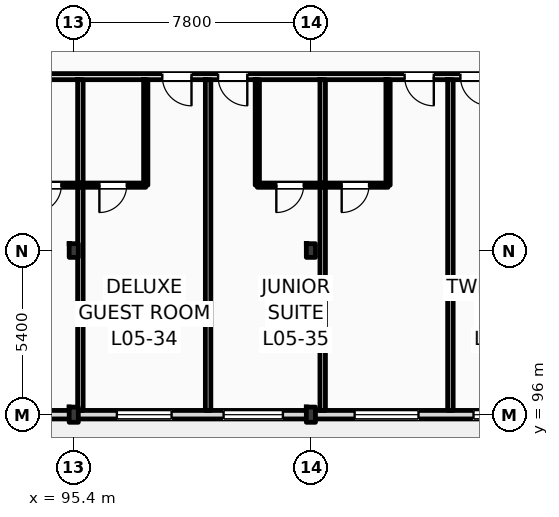
"""IFC4 building model, lengths in metres.
Left out: names, types, materials, properties, quantities, classifications, styles, units other than length and angle.
Written with IfcOpenShell. Run it as: python <this file> out.ifc"""

import sys

from ifc_helpers import new_model, si_unit, direction, frame, frame_2d, origin, origin_2d, place, context, subcontext, project, spatial, rectangle, i_section, extrude, element, fill, save


model = new_model("IFC4")
c1 = context("Model", 3, precision=1e-05, world=origin(), true_north=direction((0.0, 1.0)))
c2 = subcontext(c1, "Body", "Model", "MODEL_VIEW")
j1 = project(units=[si_unit("LENGTHUNIT", "METRE"), si_unit("PLANEANGLEUNIT", "RADIAN")], contexts=[c1])
p1 = place(None, origin())
s1 = spatial("IfcSite", under=j1, at=p1, CompositionType="ELEMENT")
p2 = place(p1, origin())
s2 = spatial("IfcBuilding", under=s1, at=p2, CompositionType="ELEMENT")
p3 = place(p2, frame((0.0, 0.0, 24.6)))
s3 = spatial("IfcBuildingStorey", under=s2, at=p3, CompositionType="ELEMENT", Elevation=24.6)
p4 = place(p3, frame((95.4, 96.0, 0.0), z_axis=(0.0, 0.0, 1.0), x_axis=(1.0, 0.0, 0.0)))
e1 = element("IfcColumn", 1, at=p4, inside=s3, PredefinedType="COLUMN", context=c2, shape_type="SweptSolid", body=[
    extrude(i_section(OverallWidth=0.3, OverallDepth=0.5, WebThickness=0.014, FlangeThickness=0.028, FilletRadius=0.027, at=origin_2d()), origin(), (0.0, 0.0, 1.0), 3.6),
])
p5 = place(p3, frame((95.4, 101.4, 0.0), z_axis=(0.0, 0.0, 1.0), x_axis=(1.0, 0.0, 0.0)))
e2 = element("IfcColumn", 2, at=p5, inside=s3, PredefinedType="COLUMN", context=c2, shape_type="SweptSolid", body=[
    extrude(i_section(OverallWidth=0.3, OverallDepth=0.45, WebThickness=0.014, FlangeThickness=0.026, FilletRadius=0.027, at=origin_2d()), origin(), (0.0, 0.0, 1.0), 3.6),
])
p6 = place(p3, frame((103.2, 96.0, 0.0), z_axis=(0.0, 0.0, 1.0), x_axis=(1.0, 0.0, 0.0)))
e3 = element("IfcColumn", 3, at=p6, inside=s3, PredefinedType="COLUMN", context=c2, shape_type="SweptSolid", body=[
    extrude(i_section(OverallWidth=0.3, OverallDepth=0.5, WebThickness=0.014, FlangeThickness=0.028, FilletRadius=0.027, at=origin_2d()), origin(), (0.0, 0.0, 1.0), 3.6),
])
p7 = place(p3, frame((103.2, 101.4, 0.0), z_axis=(0.0, 0.0, 1.0), x_axis=(1.0, 0.0, 0.0)))
e4 = element("IfcColumn", 4, at=p7, inside=s3, PredefinedType="COLUMN", context=c2, shape_type="SweptSolid", body=[
    extrude(i_section(OverallWidth=0.3, OverallDepth=0.45, WebThickness=0.014, FlangeThickness=0.026, FilletRadius=0.027, at=origin_2d()), origin(), (0.0, 0.0, 1.0), 3.6),
])
p8 = place(p3, frame((25.2, 96.0, 0.0), z_axis=(0.0, 0.0, 1.0), x_axis=(1.0, 0.0, 0.0)))
e5 = element("IfcWall", 5, at=p8, inside=s3, PredefinedType="STANDARD", context=c2, shape_type="SweptSolid", body=[
    extrude(rectangle(XDim=94.8, YDim=0.28, at=frame_2d((47.4, 0.0))), origin(), (0.0, 0.0, 1.0), 2.78),
])
p9 = place(p8, frame((16.539, 0.0, 0.9)))
e6 = element("IfcOpeningElement", 6, at=p9, cuts=e5, PredefinedType="OPENING", context=c2, shape_type="SweptSolid", body=[
    extrude(rectangle(XDim=1.75, YDim=1.7, at=frame_2d((0.875, 0.85))), frame((0.0, 0.15, 0.0), z_axis=(0.0, -1.0, 0.0), x_axis=(1.0, 0.0, 0.0)), (0.0, 0.0, 1.0), 0.3),
])
p10 = place(p8, frame((20.367, 0.0, 0.9)))
e7 = element("IfcOpeningElement", 7, at=p10, cuts=e5, PredefinedType="OPENING", context=c2, shape_type="SweptSolid", body=[
    extrude(rectangle(XDim=2.0, YDim=1.7, at=frame_2d((1.0, 0.85))), frame((0.0, 0.15, 0.0), z_axis=(0.0, -1.0, 0.0), x_axis=(1.0, 0.0, 0.0)), (0.0, 0.0, 1.0), 0.3),
])
p11 = place(p8, frame((24.326, 0.0, 0.9)))
e8 = element("IfcOpeningElement", 8, at=p11, cuts=e5, PredefinedType="OPENING", context=c2, shape_type="SweptSolid", body=[
    extrude(rectangle(XDim=2.3, YDim=1.7, at=frame_2d((1.15, 0.85))), frame((0.0, 0.15, 0.0), z_axis=(0.0, -1.0, 0.0), x_axis=(1.0, 0.0, 0.0)), (0.0, 0.0, 1.0), 0.3),
])
p12 = place(p8, frame((27.684, 0.0, 0.9)))
e9 = element("IfcOpeningElement", 9, at=p12, cuts=e5, PredefinedType="OPENING", context=c2, shape_type="SweptSolid", body=[
    extrude(rectangle(XDim=2.6, YDim=1.7, at=frame_2d((1.3, 0.85))), frame((0.0, 0.15, 0.0), z_axis=(0.0, -1.0, 0.0), x_axis=(1.0, 0.0, 0.0)), (0.0, 0.0, 1.0), 0.3),
])
p13 = place(p8, frame((32.083, 0.0, 0.9)))
e10 = element("IfcOpeningElement", 10, at=p13, cuts=e5, PredefinedType="OPENING", context=c2, shape_type="SweptSolid", body=[
    extrude(rectangle(XDim=2.419, YDim=1.7, at=frame_2d((1.209, 0.85))), frame((0.0, 0.15, 0.0), z_axis=(0.0, -1.0, 0.0), x_axis=(1.0, 0.0, 0.0)), (0.0, 0.0, 1.0), 0.3),
])
p14 = place(p8, frame((35.322, 0.0, 0.9)))
e11 = element("IfcOpeningElement", 11, at=p14, cuts=e5, PredefinedType="OPENING", context=c2, shape_type="SweptSolid", body=[
    extrude(rectangle(XDim=2.868, YDim=1.7, at=frame_2d((1.434, 0.85))), frame((0.0, 0.15, 0.0), z_axis=(0.0, -1.0, 0.0), x_axis=(1.0, 0.0, 0.0)), (0.0, 0.0, 1.0), 0.3),
])
p15 = place(p8, frame((56.015, 0.0, 0.9)))
e12 = element("IfcOpeningElement", 12, at=p15, cuts=e5, PredefinedType="OPENING", context=c2, shape_type="SweptSolid", body=[
    extrude(rectangle(XDim=1.2, YDim=1.7, at=frame_2d((0.6, 0.85))), frame((0.0, 0.15, 0.0), z_axis=(0.0, -1.0, 0.0), x_axis=(1.0, 0.0, 0.0)), (0.0, 0.0, 1.0), 0.3),
])
p16 = place(p8, frame((59.888, 0.0, 0.9)))
e13 = element("IfcOpeningElement", 13, at=p16, cuts=e5, PredefinedType="OPENING", context=c2, shape_type="SweptSolid", body=[
    extrude(rectangle(XDim=1.35, YDim=1.7, at=frame_2d((0.675, 0.85))), frame((0.0, 0.15, 0.0), z_axis=(0.0, -1.0, 0.0), x_axis=(1.0, 0.0, 0.0)), (0.0, 0.0, 1.0), 0.3),
])
p17 = place(p8, frame((63.799, 0.0, 0.9)))
e14 = element("IfcOpeningElement", 14, at=p17, cuts=e5, PredefinedType="OPENING", context=c2, shape_type="SweptSolid", body=[
    extrude(rectangle(XDim=1.5, YDim=1.7, at=frame_2d((0.75, 0.85))), frame((0.0, 0.15, 0.0), z_axis=(0.0, -1.0, 0.0), x_axis=(1.0, 0.0, 0.0)), (0.0, 0.0, 1.0), 0.3),
])
p18 = place(p8, frame((67.709, 0.0, 0.9)))
e15 = element("IfcOpeningElement", 15, at=p18, cuts=e5, PredefinedType="OPENING", context=c2, shape_type="SweptSolid", body=[
    extrude(rectangle(XDim=1.65, YDim=1.7, at=frame_2d((0.825, 0.85))), frame((0.0, 0.15, 0.0), z_axis=(0.0, -1.0, 0.0), x_axis=(1.0, 0.0, 0.0)), (0.0, 0.0, 1.0), 0.3),
])
p19 = place(p8, frame((71.618, 0.0, 0.9)))
e16 = element("IfcOpeningElement", 16, at=p19, cuts=e5, PredefinedType="OPENING", context=c2, shape_type="SweptSolid", body=[
    extrude(rectangle(XDim=1.8, YDim=1.7, at=frame_2d((0.9, 0.85))), frame((0.0, 0.15, 0.0), z_axis=(0.0, -1.0, 0.0), x_axis=(1.0, 0.0, 0.0)), (0.0, 0.0, 1.0), 0.3),
])
p20 = place(p8, frame((75.129, 0.0, 0.9)))
e17 = element("IfcOpeningElement", 17, at=p20, cuts=e5, PredefinedType="OPENING", context=c2, shape_type="SweptSolid", body=[
    extrude(rectangle(XDim=1.95, YDim=1.7, at=frame_2d((0.975, 0.85))), frame((0.0, 0.15, 0.0), z_axis=(0.0, -1.0, 0.0), x_axis=(1.0, 0.0, 0.0)), (0.0, 0.0, 1.0), 0.3),
])
p21 = place(p8, frame((79.439, 0.0, 0.9)))
e18 = element("IfcOpeningElement", 18, at=p21, cuts=e5, PredefinedType="OPENING", context=c2, shape_type="SweptSolid", body=[
    extrude(rectangle(XDim=2.1, YDim=1.7, at=frame_2d((1.05, 0.85))), frame((0.0, 0.15, 0.0), z_axis=(0.0, -1.0, 0.0), x_axis=(1.0, 0.0, 0.0)), (0.0, 0.0, 1.0), 0.3),
])
p22 = place(p8, frame((83.349, 0.0, 0.9)))
e19 = element("IfcOpeningElement", 19, at=p22, cuts=e5, PredefinedType="OPENING", context=c2, shape_type="SweptSolid", body=[
    extrude(rectangle(XDim=2.25, YDim=1.7, at=frame_2d((1.125, 0.85))), frame((0.0, 0.15, 0.0), z_axis=(0.0, -1.0, 0.0), x_axis=(1.0, 0.0, 0.0)), (0.0, 0.0, 1.0), 0.3),
])
p23 = place(p8, frame((87.258, 0.0, 0.9)))
e20 = element("IfcOpeningElement", 20, at=p23, cuts=e5, PredefinedType="OPENING", context=c2, shape_type="SweptSolid", body=[
    extrude(rectangle(XDim=2.4, YDim=1.7, at=frame_2d((1.2, 0.85))), frame((0.0, 0.15, 0.0), z_axis=(0.0, -1.0, 0.0), x_axis=(1.0, 0.0, 0.0)), (0.0, 0.0, 1.0), 0.3),
])
p24 = place(p8, frame((91.204, 0.0, 0.9)))
e21 = element("IfcOpeningElement", 21, at=p24, cuts=e5, PredefinedType="OPENING", context=c2, shape_type="SweptSolid", body=[
    extrude(rectangle(XDim=2.55, YDim=1.7, at=frame_2d((1.275, 0.85))), frame((0.0, 0.15, 0.0), z_axis=(0.0, -1.0, 0.0), x_axis=(1.0, 0.0, 0.0)), (0.0, 0.0, 1.0), 0.3),
])
p25 = place(p3, frame((79.76, 107.12, 0.0), z_axis=(0.0, 0.0, 1.0), x_axis=(1.0, 0.0, 0.0)))
e22 = element("IfcWall", 22, at=p25, inside=s3, PredefinedType="PARTITIONING", context=c2, shape_type="SweptSolid", body=[
    extrude(rectangle(XDim=40.1, YDim=0.2, at=frame_2d((20.05, 0.0))), origin(), (0.0, 0.0, 1.0), 3.34),
])
p26 = place(p25, frame((2.65, 0.0, 0.0)))
e23 = element("IfcOpeningElement", 23, at=p26, cuts=e22, PredefinedType="OPENING", context=c2, shape_type="SweptSolid", body=[
    extrude(rectangle(XDim=0.96, YDim=2.2, at=frame_2d((0.48, 1.1))), frame((0.0, 0.11, 0.0), z_axis=(0.0, -1.0, 0.0), x_axis=(1.0, 0.0, 0.0)), (0.0, 0.0, 1.0), 0.22),
])
p27 = place(p25, frame((4.448, 0.0, 0.0)))
e24 = element("IfcOpeningElement", 24, at=p27, cuts=e22, PredefinedType="OPENING", context=c2, shape_type="SweptSolid", body=[
    extrude(rectangle(XDim=0.96, YDim=2.2, at=frame_2d((0.48, 1.1))), frame((0.0, 0.11, 0.0), z_axis=(0.0, -1.0, 0.0), x_axis=(1.0, 0.0, 0.0)), (0.0, 0.0, 1.0), 0.22),
])
p28 = place(p25, frame((10.583, 0.0, 0.0)))
e25 = element("IfcOpeningElement", 25, at=p28, cuts=e22, PredefinedType="OPENING", context=c2, shape_type="SweptSolid", body=[
    extrude(rectangle(XDim=0.96, YDim=2.2, at=frame_2d((0.48, 1.1))), frame((0.0, 0.11, 0.0), z_axis=(0.0, -1.0, 0.0), x_axis=(1.0, 0.0, 0.0)), (0.0, 0.0, 1.0), 0.22),
])
p29 = place(p25, frame((12.418, 0.0, 0.0)))
e26 = element("IfcOpeningElement", 26, at=p29, cuts=e22, PredefinedType="OPENING", context=c2, shape_type="SweptSolid", body=[
    extrude(rectangle(XDim=0.96, YDim=2.2, at=frame_2d((0.48, 1.1))), frame((0.0, 0.11, 0.0), z_axis=(0.0, -1.0, 0.0), x_axis=(1.0, 0.0, 0.0)), (0.0, 0.0, 1.0), 0.22),
])
p30 = place(p25, frame((18.553, 0.0, 0.0)))
e27 = element("IfcOpeningElement", 27, at=p30, cuts=e22, PredefinedType="OPENING", context=c2, shape_type="SweptSolid", body=[
    extrude(rectangle(XDim=0.96, YDim=2.2, at=frame_2d((0.48, 1.1))), frame((0.0, 0.11, 0.0), z_axis=(0.0, -1.0, 0.0), x_axis=(1.0, 0.0, 0.0)), (0.0, 0.0, 1.0), 0.22),
])
p31 = place(p25, frame((20.388, 0.0, 0.0)))
e28 = element("IfcOpeningElement", 28, at=p31, cuts=e22, PredefinedType="OPENING", context=c2, shape_type="SweptSolid", body=[
    extrude(rectangle(XDim=0.96, YDim=2.2, at=frame_2d((0.48, 1.1))), frame((0.0, 0.11, 0.0), z_axis=(0.0, -1.0, 0.0), x_axis=(1.0, 0.0, 0.0)), (0.0, 0.0, 1.0), 0.22),
])
p32 = place(p25, frame((26.523, 0.0, 0.0)))
e29 = element("IfcOpeningElement", 29, at=p32, cuts=e22, PredefinedType="OPENING", context=c2, shape_type="SweptSolid", body=[
    extrude(rectangle(XDim=0.96, YDim=2.2, at=frame_2d((0.48, 1.1))), frame((0.0, 0.11, 0.0), z_axis=(0.0, -1.0, 0.0), x_axis=(1.0, 0.0, 0.0)), (0.0, 0.0, 1.0), 0.22),
])
p33 = place(p25, frame((28.358, 0.0, 0.0)))
e30 = element("IfcOpeningElement", 30, at=p33, cuts=e22, PredefinedType="OPENING", context=c2, shape_type="SweptSolid", body=[
    extrude(rectangle(XDim=0.96, YDim=2.2, at=frame_2d((0.48, 1.1))), frame((0.0, 0.11, 0.0), z_axis=(0.0, -1.0, 0.0), x_axis=(1.0, 0.0, 0.0)), (0.0, 0.0, 1.0), 0.22),
])
p34 = place(p25, frame((34.493, 0.0, 0.0)))
e31 = element("IfcOpeningElement", 31, at=p34, cuts=e22, PredefinedType="OPENING", context=c2, shape_type="SweptSolid", body=[
    extrude(rectangle(XDim=0.96, YDim=2.2, at=frame_2d((0.48, 1.1))), frame((0.0, 0.11, 0.0), z_axis=(0.0, -1.0, 0.0), x_axis=(1.0, 0.0, 0.0)), (0.0, 0.0, 1.0), 0.22),
])
p35 = place(p25, frame((36.364, 0.0, 0.0)))
e32 = element("IfcOpeningElement", 32, at=p35, cuts=e22, PredefinedType="OPENING", context=c2, shape_type="SweptSolid", body=[
    extrude(rectangle(XDim=0.96, YDim=2.2, at=frame_2d((0.48, 1.1))), frame((0.0, 0.11, 0.0), z_axis=(0.0, -1.0, 0.0), x_axis=(1.0, 0.0, 0.0)), (0.0, 0.0, 1.0), 0.22),
])
p36 = place(p3, frame((95.618, 96.14, 0.0), z_axis=(0.0, 0.0, 1.0), x_axis=(0.0, 1.0, 0.0)))
e33 = element("IfcWall", 33, at=p36, inside=s3, PredefinedType="PARTITIONING", context=c2, shape_type="SweptSolid", body=[
    extrude(rectangle(XDim=10.88, YDim=0.18, at=frame_2d((5.44, 0.0))), origin(), (0.0, 0.0, 1.0), 2.93),
])
p37 = place(p3, frame((93.468, 103.55, 0.0), z_axis=(0.0, 0.0, 1.0), x_axis=(1.0, 0.0, 0.0)))
e34 = element("IfcWall", 34, at=p37, inside=s3, PredefinedType="PARTITIONING", context=c2, shape_type="SweptSolid", body=[
    extrude(rectangle(XDim=2.15, YDim=0.14, at=frame_2d((1.075, 0.0))), origin(), (0.0, 0.0, 1.0), 3.34),
])
p38 = place(p37, frame((0.625, 0.0, 0.0)))
e35 = element("IfcOpeningElement", 35, at=p38, cuts=e34, PredefinedType="OPENING", context=c2, shape_type="SweptSolid", body=[
    extrude(rectangle(XDim=0.9, YDim=2.1, at=frame_2d((0.45, 1.05))), frame((0.0, 0.08, 0.0), z_axis=(0.0, -1.0, 0.0), x_axis=(1.0, 0.0, 0.0)), (0.0, 0.0, 1.0), 0.16),
])
p39 = place(p3, frame((99.819, 96.14, 0.0), z_axis=(0.0, 0.0, 1.0), x_axis=(0.0, 1.0, 0.0)))
e36 = element("IfcWall", 36, at=p39, inside=s3, PredefinedType="PARTITIONING", context=c2, shape_type="SweptSolid", body=[
    extrude(rectangle(XDim=10.88, YDim=0.18, at=frame_2d((5.44, 0.0))), origin(), (0.0, 0.0, 1.0), 3.34),
])
p40 = place(p3, frame((97.768, 103.55, 0.0), z_axis=(0.0, 0.0, 1.0), x_axis=(0.0, 1.0, 0.0)))
e37 = element("IfcWall", 37, at=p40, inside=s3, PredefinedType="PARTITIONING", context=c2, shape_type="SweptSolid", body=[
    extrude(rectangle(XDim=3.47, YDim=0.14, at=frame_2d((1.735, 0.0))), origin(), (0.0, 0.0, 1.0), 3.34),
])
p41 = place(p3, frame((95.618, 103.55, 0.0), z_axis=(0.0, 0.0, 1.0), x_axis=(1.0, 0.0, 0.0)))
e38 = element("IfcWall", 38, at=p41, inside=s3, PredefinedType="PARTITIONING", context=c2, shape_type="SweptSolid", body=[
    extrude(rectangle(XDim=2.15, YDim=0.14, at=frame_2d((1.075, 0.0))), origin(), (0.0, 0.0, 1.0), 3.34),
])
p42 = place(p41, frame((0.625, 0.0, 0.0)))
e39 = element("IfcOpeningElement", 39, at=p42, cuts=e38, PredefinedType="OPENING", context=c2, shape_type="SweptSolid", body=[
    extrude(rectangle(XDim=0.9, YDim=2.1, at=frame_2d((0.45, 1.05))), frame((0.0, 0.08, 0.0), z_axis=(0.0, -1.0, 0.0), x_axis=(1.0, 0.0, 0.0)), (0.0, 0.0, 1.0), 0.16),
])
p43 = place(p3, frame((103.588, 96.14, 0.0), z_axis=(0.0, 0.0, 1.0), x_axis=(0.0, 1.0, 0.0)))
e40 = element("IfcWall", 40, at=p43, inside=s3, PredefinedType="PARTITIONING", context=c2, shape_type="SweptSolid", body=[
    extrude(rectangle(XDim=10.88, YDim=0.18, at=frame_2d((5.44, 0.0))), origin(), (0.0, 0.0, 1.0), 3.34),
])
p44 = place(p3, frame((101.438, 103.55, 0.0), z_axis=(0.0, 0.0, 1.0), x_axis=(0.0, 1.0, 0.0)))
e41 = element("IfcWall", 41, at=p44, inside=s3, PredefinedType="PARTITIONING", context=c2, shape_type="SweptSolid", body=[
    extrude(rectangle(XDim=3.47, YDim=0.14, at=frame_2d((1.735, 0.0))), origin(), (0.0, 0.0, 1.0), 3.34),
])
p45 = place(p3, frame((101.438, 103.55, 0.0), z_axis=(0.0, 0.0, 1.0), x_axis=(1.0, 0.0, 0.0)))
e42 = element("IfcWall", 42, at=p45, inside=s3, PredefinedType="PARTITIONING", context=c2, shape_type="SweptSolid", body=[
    extrude(rectangle(XDim=2.15, YDim=0.14, at=frame_2d((1.075, 0.0))), origin(), (0.0, 0.0, 1.0), 3.34),
])
p46 = place(p45, frame((0.625, 0.0, 0.0)))
e43 = element("IfcOpeningElement", 43, at=p46, cuts=e42, PredefinedType="OPENING", context=c2, shape_type="SweptSolid", body=[
    extrude(rectangle(XDim=0.9, YDim=2.1, at=frame_2d((0.45, 1.05))), frame((0.0, 0.08, 0.0), z_axis=(0.0, -1.0, 0.0), x_axis=(1.0, 0.0, 0.0)), (0.0, 0.0, 1.0), 0.16),
])
p47 = place(p3, frame((107.789, 96.14, 0.0), z_axis=(0.0, 0.0, 1.0), x_axis=(0.0, 1.0, 0.0)))
e44 = element("IfcWall", 44, at=p47, inside=s3, PredefinedType="PARTITIONING", context=c2, shape_type="SweptSolid", body=[
    extrude(rectangle(XDim=10.88, YDim=0.18, at=frame_2d((5.44, 0.0))), origin(), (0.0, 0.0, 1.0), 3.34),
])
p48 = place(p3, frame((105.738, 103.55, 0.0), z_axis=(0.0, 0.0, 1.0), x_axis=(0.0, 1.0, 0.0)))
e45 = element("IfcWall", 45, at=p48, inside=s3, PredefinedType="PARTITIONING", context=c2, shape_type="SweptSolid", body=[
    extrude(rectangle(XDim=3.47, YDim=0.14, at=frame_2d((1.735, 0.0))), origin(), (0.0, 0.0, 1.0), 3.34),
])
p49 = place(p3, frame((103.588, 103.55, 0.0), z_axis=(0.0, 0.0, 1.0), x_axis=(1.0, 0.0, 0.0)))
e46 = element("IfcWall", 46, at=p49, inside=s3, PredefinedType="PARTITIONING", context=c2, shape_type="SweptSolid", body=[
    extrude(rectangle(XDim=2.15, YDim=0.14, at=frame_2d((1.075, 0.0))), origin(), (0.0, 0.0, 1.0), 3.34),
])
p50 = place(p49, frame((0.625, 0.0, 0.0)))
e47 = element("IfcOpeningElement", 47, at=p50, cuts=e46, PredefinedType="OPENING", context=c2, shape_type="SweptSolid", body=[
    extrude(rectangle(XDim=0.9, YDim=2.1, at=frame_2d((0.45, 1.05))), frame((0.0, 0.08, 0.0), z_axis=(0.0, -1.0, 0.0), x_axis=(1.0, 0.0, 0.0)), (0.0, 0.0, 1.0), 0.16),
])
p51 = place(p19, origin())
e48 = element("IfcWindow", 48, at=p51, inside=s3, PartitioningType="DOUBLE_PANEL_VERTICAL", PredefinedType="WINDOW", context=c2, shape_type="SweptSolid", body=[
    extrude(rectangle(XDim=1.8, YDim=1.7, at=frame_2d((0.9, 0.85))), frame((0.0, 0.03, 0.0), z_axis=(0.0, -1.0, 0.0), x_axis=(1.0, 0.0, 0.0)), (0.0, 0.0, 1.0), 0.06),
])
fill(e16, e48)
p52 = place(p20, origin())
e49 = element("IfcWindow", 49, at=p52, inside=s3, PartitioningType="DOUBLE_PANEL_VERTICAL", PredefinedType="WINDOW", context=c2, shape_type="SweptSolid", body=[
    extrude(rectangle(XDim=1.95, YDim=1.7, at=frame_2d((0.975, 0.85))), frame((0.0, 0.03, 0.0), z_axis=(0.0, -1.0, 0.0), x_axis=(1.0, 0.0, 0.0)), (0.0, 0.0, 1.0), 0.06),
])
fill(e17, e49)
p53 = place(p21, origin())
e50 = element("IfcWindow", 50, at=p53, inside=s3, PartitioningType="DOUBLE_PANEL_VERTICAL", PredefinedType="WINDOW", context=c2, shape_type="SweptSolid", body=[
    extrude(rectangle(XDim=2.1, YDim=1.7, at=frame_2d((1.05, 0.85))), frame((0.0, 0.03, 0.0), z_axis=(0.0, -1.0, 0.0), x_axis=(1.0, 0.0, 0.0)), (0.0, 0.0, 1.0), 0.06),
])
fill(e18, e50)
p54 = place(p22, origin())
e51 = element("IfcWindow", 51, at=p54, inside=s3, PartitioningType="DOUBLE_PANEL_VERTICAL", PredefinedType="WINDOW", context=c2, shape_type="SweptSolid", body=[
    extrude(rectangle(XDim=2.25, YDim=1.7, at=frame_2d((1.125, 0.85))), frame((0.0, 0.03, 0.0), z_axis=(0.0, -1.0, 0.0), x_axis=(1.0, 0.0, 0.0)), (0.0, 0.0, 1.0), 0.06),
])
fill(e19, e51)
p55 = place(p38, frame((0.9, 0.0, 0.0), z_axis=(0.0, 0.0, 1.0), x_axis=(-1.0, 0.0, 0.0)))
e52 = element("IfcDoor", 52, at=p55, inside=s3, OperationType="SINGLE_SWING_LEFT", PredefinedType="DOOR", context=c2, shape_type="SweptSolid", body=[
    extrude(rectangle(XDim=0.9, YDim=2.1, at=frame_2d((0.45, 1.05))), frame((0.0, 0.025, 0.0), z_axis=(0.0, -1.0, 0.0), x_axis=(1.0, 0.0, 0.0)), (0.0, 0.0, 1.0), 0.05),
])
fill(e35, e52)
p56 = place(p30, frame((0.96, 0.0, 0.0), z_axis=(0.0, 0.0, 1.0), x_axis=(-1.0, 0.0, 0.0)))
e53 = element("IfcDoor", 53, at=p56, inside=s3, OperationType="SINGLE_SWING_RIGHT", PredefinedType="DOOR", context=c2, shape_type="SweptSolid", body=[
    extrude(rectangle(XDim=0.96, YDim=2.2, at=frame_2d((0.48, 1.1))), frame((0.0, 0.025, 0.0), z_axis=(0.0, -1.0, 0.0), x_axis=(1.0, 0.0, 0.0)), (0.0, 0.0, 1.0), 0.05),
])
fill(e27, e53)
p57 = place(p42, frame((0.9, 0.0, 0.0), z_axis=(0.0, 0.0, 1.0), x_axis=(-1.0, 0.0, 0.0)))
e54 = element("IfcDoor", 54, at=p57, inside=s3, OperationType="SINGLE_SWING_LEFT", PredefinedType="DOOR", context=c2, shape_type="SweptSolid", body=[
    extrude(rectangle(XDim=0.9, YDim=2.1, at=frame_2d((0.45, 1.05))), frame((0.0, 0.025, 0.0), z_axis=(0.0, -1.0, 0.0), x_axis=(1.0, 0.0, 0.0)), (0.0, 0.0, 1.0), 0.05),
])
fill(e39, e54)
p58 = place(p31, frame((0.96, 0.0, 0.0), z_axis=(0.0, 0.0, 1.0), x_axis=(-1.0, 0.0, 0.0)))
e55 = element("IfcDoor", 55, at=p58, inside=s3, OperationType="SINGLE_SWING_RIGHT", PredefinedType="DOOR", context=c2, shape_type="SweptSolid", body=[
    extrude(rectangle(XDim=0.96, YDim=2.2, at=frame_2d((0.48, 1.1))), frame((0.0, 0.025, 0.0), z_axis=(0.0, -1.0, 0.0), x_axis=(1.0, 0.0, 0.0)), (0.0, 0.0, 1.0), 0.05),
])
fill(e28, e55)
p59 = place(p46, frame((0.9, 0.0, 0.0), z_axis=(0.0, 0.0, 1.0), x_axis=(-1.0, 0.0, 0.0)))
e56 = element("IfcDoor", 56, at=p59, inside=s3, OperationType="SINGLE_SWING_LEFT", PredefinedType="DOOR", context=c2, shape_type="SweptSolid", body=[
    extrude(rectangle(XDim=0.9, YDim=2.1, at=frame_2d((0.45, 1.05))), frame((0.0, 0.025, 0.0), z_axis=(0.0, -1.0, 0.0), x_axis=(1.0, 0.0, 0.0)), (0.0, 0.0, 1.0), 0.05),
])
fill(e43, e56)
p60 = place(p32, frame((0.96, 0.0, 0.0), z_axis=(0.0, 0.0, 1.0), x_axis=(-1.0, 0.0, 0.0)))
e57 = element("IfcDoor", 57, at=p60, inside=s3, OperationType="SINGLE_SWING_RIGHT", PredefinedType="DOOR", context=c2, shape_type="SweptSolid", body=[
    extrude(rectangle(XDim=0.96, YDim=2.2, at=frame_2d((0.48, 1.1))), frame((0.0, 0.025, 0.0), z_axis=(0.0, -1.0, 0.0), x_axis=(1.0, 0.0, 0.0)), (0.0, 0.0, 1.0), 0.05),
])
fill(e29, e57)
p61 = place(p50, frame((0.9, 0.0, 0.0), z_axis=(0.0, 0.0, 1.0), x_axis=(-1.0, 0.0, 0.0)))
e58 = element("IfcDoor", 58, at=p61, inside=s3, OperationType="SINGLE_SWING_LEFT", PredefinedType="DOOR", context=c2, shape_type="SweptSolid", body=[
    extrude(rectangle(XDim=0.9, YDim=2.1, at=frame_2d((0.45, 1.05))), frame((0.0, 0.025, 0.0), z_axis=(0.0, -1.0, 0.0), x_axis=(1.0, 0.0, 0.0)), (0.0, 0.0, 1.0), 0.05),
])
fill(e47, e58)
p62 = place(p33, frame((0.96, 0.0, 0.0), z_axis=(0.0, 0.0, 1.0), x_axis=(-1.0, 0.0, 0.0)))
e59 = element("IfcDoor", 59, at=p62, inside=s3, OperationType="SINGLE_SWING_RIGHT", PredefinedType="DOOR", context=c2, shape_type="SweptSolid", body=[
    extrude(rectangle(XDim=0.96, YDim=2.2, at=frame_2d((0.48, 1.1))), frame((0.0, 0.025, 0.0), z_axis=(0.0, -1.0, 0.0), x_axis=(1.0, 0.0, 0.0)), (0.0, 0.0, 1.0), 0.05),
])
fill(e30, e59)
save(model, sys.argv[1])
